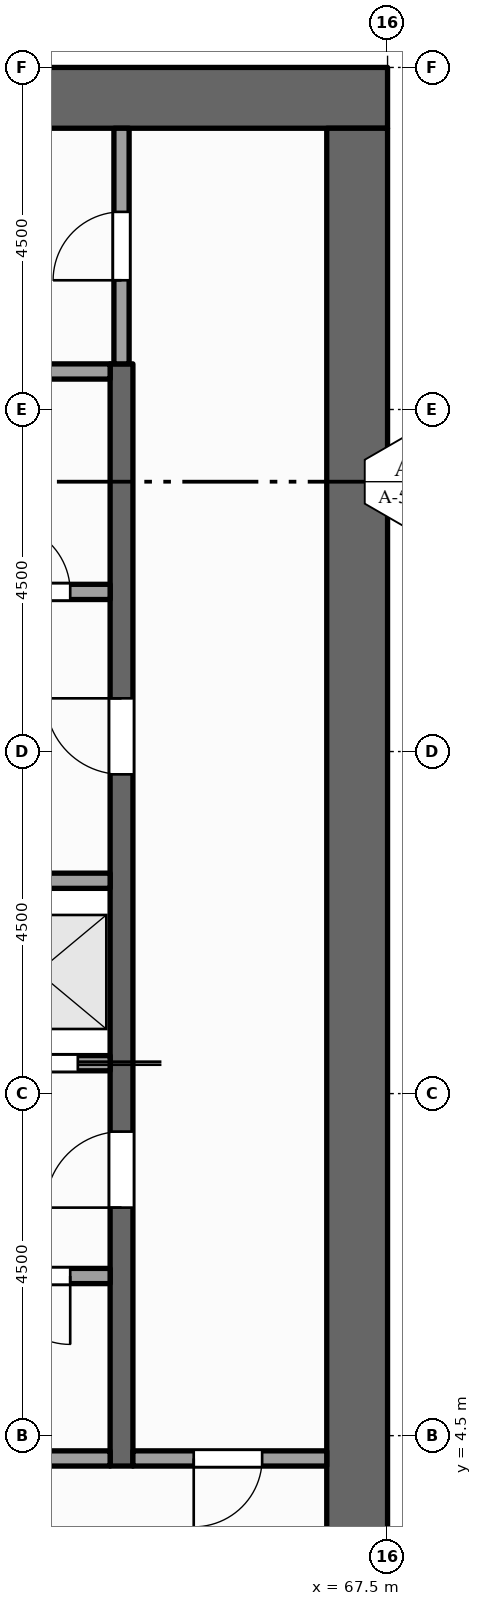
"""IFC4 building model, lengths in metres.
Left out: names, types, materials, properties, quantities, classifications, styles, units other than length and angle.
Written with IfcOpenShell. Run it as: python <this file> out.ifc"""

import sys

from ifc_helpers import new_model, si_unit, direction, frame, frame_2d, origin, place, context, subcontext, project, spatial, rectangle, extrude, element, fill, save


model = new_model("IFC4")
c1 = context("Model", 3, precision=1e-05, world=origin(), true_north=direction((0.0, 1.0)))
c2 = subcontext(c1, "Body", "Model", "MODEL_VIEW")
j1 = project(units=[si_unit("LENGTHUNIT", "METRE"), si_unit("PLANEANGLEUNIT", "RADIAN")], contexts=[c1])
p1 = place(None, origin())
s1 = spatial("IfcSite", under=j1, at=p1, CompositionType="ELEMENT")
p2 = place(p1, origin())
s2 = spatial("IfcBuilding", under=s1, at=p2, CompositionType="ELEMENT")
p3 = place(p2, frame((0.0, 0.0, 293.0)))
s3 = spatial("IfcBuildingStorey", under=s2, at=p3, CompositionType="ELEMENT", Elevation=293.0)
p4 = place(p3, frame((54.0, 22.1, -0.15), z_axis=(0.0, 0.0, 1.0), x_axis=(1.0, 0.0, 0.0)))
e1 = element("IfcWall", 1, at=p4, inside=s3, PredefinedType="SHEAR", context=c2, shape_type="SweptSolid", body=[
    extrude(rectangle(XDim=13.5, YDim=0.8, at=frame_2d((6.75, 0.0))), origin(), (0.0, 0.0, 1.0), 4.0),
])
p5 = place(p3, frame((67.1, 0.8, -0.15), z_axis=(0.0, 0.0, 1.0), x_axis=(0.0, 1.0, 0.0)))
e2 = element("IfcWall", 2, at=p5, inside=s3, PredefinedType="SHEAR", context=c2, shape_type="SweptSolid", body=[
    extrude(rectangle(XDim=20.9, YDim=0.8, at=frame_2d((10.45, 0.0))), origin(), (0.0, 0.0, 1.0), 4.0),
])
p6 = place(p3, frame((64.0, 4.1, 0.0), z_axis=(0.0, 0.0, 1.0), x_axis=(0.0, 1.0, 0.0)))
e3 = element("IfcWall", 3, at=p6, inside=s3, PredefinedType="SHEAR", context=c2, shape_type="SweptSolid", body=[
    extrude(rectangle(XDim=14.5, YDim=0.3, at=frame_2d((7.25, 0.0))), origin(), (0.0, 0.0, 1.0), 3.75),
])
p7 = place(p6, frame((3.4, 0.0, 0.0)))
e4 = element("IfcOpeningElement", 4, at=p7, cuts=e3, PredefinedType="OPENING", context=c2, shape_type="SweptSolid", body=[
    extrude(rectangle(XDim=1.0, YDim=2.1, at=frame_2d((0.5, 1.05))), frame((0.0, 0.16, 0.0), z_axis=(0.0, -1.0, 0.0), x_axis=(1.0, 0.0, 0.0)), (0.0, 0.0, 1.0), 0.32),
])
p8 = place(p6, frame((9.1, 0.0, 0.0)))
e5 = element("IfcOpeningElement", 5, at=p8, cuts=e3, PredefinedType="OPENING", context=c2, shape_type="SweptSolid", body=[
    extrude(rectangle(XDim=1.0, YDim=2.1, at=frame_2d((0.5, 1.05))), frame((0.0, 0.16, 0.0), z_axis=(0.0, -1.0, 0.0), x_axis=(1.0, 0.0, 0.0)), (0.0, 0.0, 1.0), 0.32),
])
p9 = place(p3, frame((64.0, 18.6, 0.0), z_axis=(0.0, 0.0, 1.0), x_axis=(0.0, 1.0, 0.0)))
e6 = element("IfcWall", 6, at=p9, inside=s3, PredefinedType="PARTITIONING", context=c2, shape_type="SweptSolid", body=[
    extrude(rectangle(XDim=3.1, YDim=0.2, at=frame_2d((1.55, 0.0))), origin(), (0.0, 0.0, 1.0), 3.75),
])
p10 = place(p9, frame((1.1, 0.0, 0.0)))
e7 = element("IfcOpeningElement", 7, at=p10, cuts=e6, PredefinedType="OPENING", context=c2, shape_type="SweptSolid", body=[
    extrude(rectangle(XDim=0.9, YDim=2.1, at=frame_2d((0.45, 1.05))), frame((0.0, 0.11, 0.0), z_axis=(0.0, -1.0, 0.0), x_axis=(1.0, 0.0, 0.0)), (0.0, 0.0, 1.0), 0.22),
])
p11 = place(p3, frame((61.9, 4.2, 0.0), z_axis=(0.0, 0.0, 1.0), x_axis=(1.0, 0.0, 0.0)))
e8 = element("IfcWall", 8, at=p11, inside=s3, PredefinedType="PARTITIONING", context=c2, shape_type="SweptSolid", body=[
    extrude(rectangle(XDim=1.95, YDim=0.2, at=frame_2d((0.975, 0.0))), origin(), (0.0, 0.0, 1.0), 3.75),
])
p12 = place(p3, frame((64.15, 4.2, 0.0), z_axis=(0.0, 0.0, 1.0), x_axis=(1.0, 0.0, 0.0)))
e9 = element("IfcWall", 9, at=p12, inside=s3, PredefinedType="PARTITIONING", context=c2, shape_type="SweptSolid", body=[
    extrude(rectangle(XDim=2.55, YDim=0.2, at=frame_2d((1.275, 0.0))), origin(), (0.0, 0.0, 1.0), 3.75),
])
p13 = place(p12, frame((0.8, 0.0, 0.0)))
e10 = element("IfcOpeningElement", 10, at=p13, cuts=e9, PredefinedType="OPENING", context=c2, shape_type="SweptSolid", body=[
    extrude(rectangle(XDim=0.9, YDim=2.1, at=frame_2d((0.45, 1.05))), frame((0.0, 0.11, 0.0), z_axis=(0.0, -1.0, 0.0), x_axis=(1.0, 0.0, 0.0)), (0.0, 0.0, 1.0), 0.22),
])
p14 = place(p3, frame((61.9, 6.6, 0.0), z_axis=(0.0, 0.0, 1.0), x_axis=(1.0, 0.0, 0.0)))
e11 = element("IfcWall", 11, at=p14, inside=s3, PredefinedType="PARTITIONING", context=c2, shape_type="SweptSolid", body=[
    extrude(rectangle(XDim=1.95, YDim=0.2, at=frame_2d((0.975, 0.0))), origin(), (0.0, 0.0, 1.0), 3.75),
])
p15 = place(p14, frame((0.525, 0.0, 0.0)))
e12 = element("IfcOpeningElement", 12, at=p15, cuts=e11, PredefinedType="OPENING", context=c2, shape_type="SweptSolid", body=[
    extrude(rectangle(XDim=0.9, YDim=2.1, at=frame_2d((0.45, 1.05))), frame((0.0, 0.11, 0.0), z_axis=(0.0, -1.0, 0.0), x_axis=(1.0, 0.0, 0.0)), (0.0, 0.0, 1.0), 0.22),
])
p16 = place(p3, frame((61.9, 9.4, 0.0), z_axis=(0.0, 0.0, 1.0), x_axis=(1.0, 0.0, 0.0)))
e13 = element("IfcWall", 13, at=p16, inside=s3, PredefinedType="SOLIDWALL", context=c2, shape_type="SweptSolid", body=[
    extrude(rectangle(XDim=1.95, YDim=0.2, at=frame_2d((0.975, 0.0))), origin(), (0.0, 0.0, 1.0), 3.75),
])
p17 = place(p16, frame((0.425, 0.0, 0.012)))
e14 = element("IfcOpeningElement", 14, at=p17, cuts=e13, PredefinedType="OPENING", context=c2, shape_type="SweptSolid", body=[
    extrude(rectangle(XDim=1.1, YDim=2.1, at=frame_2d((0.55, 1.05))), frame((0.0, 0.11, 0.0), z_axis=(0.0, -1.0, 0.0), x_axis=(1.0, 0.0, 0.0)), (0.0, 0.0, 1.0), 0.22),
])
p18 = place(p3, frame((61.9, 11.8, 0.0), z_axis=(0.0, 0.0, 1.0), x_axis=(1.0, 0.0, 0.0)))
e15 = element("IfcWall", 15, at=p18, inside=s3, PredefinedType="SOLIDWALL", context=c2, shape_type="SweptSolid", body=[
    extrude(rectangle(XDim=1.95, YDim=0.2, at=frame_2d((0.975, 0.0))), origin(), (0.0, 0.0, 1.0), 3.75),
])
p19 = place(p3, frame((61.9, 15.6, 0.0), z_axis=(0.0, 0.0, 1.0), x_axis=(1.0, 0.0, 0.0)))
e16 = element("IfcWall", 16, at=p19, inside=s3, PredefinedType="PARTITIONING", context=c2, shape_type="SweptSolid", body=[
    extrude(rectangle(XDim=1.95, YDim=0.2, at=frame_2d((0.975, 0.0))), origin(), (0.0, 0.0, 1.0), 3.75),
])
p20 = place(p19, frame((0.525, 0.0, 0.0)))
e17 = element("IfcOpeningElement", 17, at=p20, cuts=e16, PredefinedType="OPENING", context=c2, shape_type="SweptSolid", body=[
    extrude(rectangle(XDim=0.9, YDim=2.1, at=frame_2d((0.45, 1.05))), frame((0.0, 0.11, 0.0), z_axis=(0.0, -1.0, 0.0), x_axis=(1.0, 0.0, 0.0)), (0.0, 0.0, 1.0), 0.22),
])
p21 = place(p3, frame((61.9, 18.5, 0.0), z_axis=(0.0, 0.0, 1.0), x_axis=(1.0, 0.0, 0.0)))
e18 = element("IfcWall", 18, at=p21, inside=s3, PredefinedType="PARTITIONING", context=c2, shape_type="SweptSolid", body=[
    extrude(rectangle(XDim=1.95, YDim=0.2, at=frame_2d((0.975, 0.0))), origin(), (0.0, 0.0, 1.0), 3.75),
])
p22 = place(p17, origin())
e19 = element("IfcDoor", 19, at=p22, inside=s3, OperationType="SLIDING_TO_RIGHT", PredefinedType="DOOR", context=c2, shape_type="SweptSolid", body=[
    extrude(rectangle(XDim=1.1, YDim=2.1, at=frame_2d((0.55, 1.05))), frame((0.0, 0.025, 0.0), z_axis=(0.0, -1.0, 0.0), x_axis=(1.0, 0.0, 0.0)), (0.0, 0.0, 1.0), 0.05),
])
fill(e14, e19)
p23 = place(p7, origin())
e20 = element("IfcDoor", 20, at=p23, inside=s3, OperationType="SINGLE_SWING_LEFT", PredefinedType="DOOR", context=c2, shape_type="SweptSolid", body=[
    extrude(rectangle(XDim=1.0, YDim=2.1, at=frame_2d((0.5, 1.05))), frame((0.0, 0.025, 0.0), z_axis=(0.0, -1.0, 0.0), x_axis=(1.0, 0.0, 0.0)), (0.0, 0.0, 1.0), 0.05),
])
fill(e4, e20)
p24 = place(p8, origin())
e21 = element("IfcDoor", 21, at=p24, inside=s3, OperationType="SINGLE_SWING_RIGHT", PredefinedType="DOOR", context=c2, shape_type="SweptSolid", body=[
    extrude(rectangle(XDim=1.0, YDim=2.1, at=frame_2d((0.5, 1.05))), frame((0.0, 0.025, 0.0), z_axis=(0.0, -1.0, 0.0), x_axis=(1.0, 0.0, 0.0)), (0.0, 0.0, 1.0), 0.05),
])
fill(e5, e21)
p25 = place(p13, origin())
e22 = element("IfcDoor", 22, at=p25, inside=s3, OperationType="SINGLE_SWING_LEFT", PredefinedType="DOOR", context=c2, shape_type="SweptSolid", body=[
    extrude(rectangle(XDim=0.9, YDim=2.1, at=frame_2d((0.45, 1.05))), frame((0.0, 0.025, 0.0), z_axis=(0.0, -1.0, 0.0), x_axis=(1.0, 0.0, 0.0)), (0.0, 0.0, 1.0), 0.05),
])
fill(e10, e22)
p26 = place(p10, origin())
e23 = element("IfcDoor", 23, at=p26, inside=s3, OperationType="SINGLE_SWING_LEFT", PredefinedType="DOOR", context=c2, shape_type="SweptSolid", body=[
    extrude(rectangle(XDim=0.9, YDim=2.1, at=frame_2d((0.45, 1.05))), frame((0.0, 0.025, 0.0), z_axis=(0.0, -1.0, 0.0), x_axis=(1.0, 0.0, 0.0)), (0.0, 0.0, 1.0), 0.05),
])
fill(e7, e23)
p27 = place(p15, origin())
e24 = element("IfcDoor", 24, at=p27, inside=s3, OperationType="SINGLE_SWING_RIGHT", PredefinedType="DOOR", context=c2, shape_type="SweptSolid", body=[
    extrude(rectangle(XDim=0.9, YDim=2.1, at=frame_2d((0.45, 1.05))), frame((0.0, 0.025, 0.0), z_axis=(0.0, -1.0, 0.0), x_axis=(1.0, 0.0, 0.0)), (0.0, 0.0, 1.0), 0.05),
])
fill(e12, e24)
p28 = place(p20, origin())
e25 = element("IfcDoor", 25, at=p28, inside=s3, OperationType="SINGLE_SWING_LEFT", PredefinedType="DOOR", context=c2, shape_type="SweptSolid", body=[
    extrude(rectangle(XDim=0.9, YDim=2.1, at=frame_2d((0.45, 1.05))), frame((0.0, 0.025, 0.0), z_axis=(0.0, -1.0, 0.0), x_axis=(1.0, 0.0, 0.0)), (0.0, 0.0, 1.0), 0.05),
])
fill(e17, e25)
save(model, sys.argv[1])
